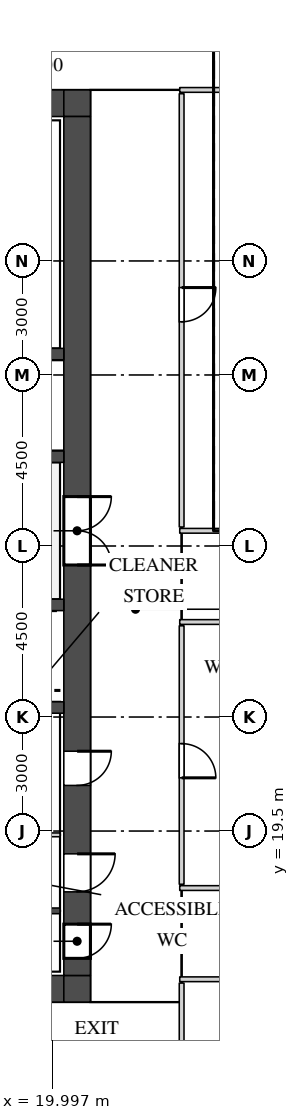
"""IFC4 building model, lengths in metres.
Left out: names, types, materials, properties, quantities, classifications, styles, units other than length and angle.
Written with IfcOpenShell. Run it as: python <this file> out.ifc"""

import sys

from ifc_helpers import new_model, si_unit, direction, frame, frame_2d, origin, place, context, subcontext, project, spatial, rectangle, extrude, source, transform, mapped, element, fill, save


model = new_model("IFC4")
c1 = context("Model", 3, precision=1e-05, world=origin(), true_north=direction((0.0, 1.0)))
c2 = subcontext(c1, "Body", "Model", "MODEL_VIEW")
j1 = project(units=[si_unit("LENGTHUNIT", "METRE"), si_unit("PLANEANGLEUNIT", "RADIAN")], contexts=[c1])
p1 = place(None, origin())
s1 = spatial("IfcSite", under=j1, at=p1, CompositionType="ELEMENT")
p2 = place(p1, origin())
s2 = spatial("IfcBuilding", under=s1, at=p2, CompositionType="ELEMENT")
p3 = place(p2, frame((0.0, 0.0, 234.2)))
s3 = spatial("IfcBuildingStorey", under=s2, at=p3, CompositionType="ELEMENT", Elevation=234.2)
m1 = source(origin(), c2, "Body", "SweptSolid", [
    extrude(rectangle(XDim=13.6, YDim=0.7, at=frame_2d((6.8, 0.0))), origin(), (0.0, 0.0, 1.0), 3.75),
])
p4 = place(p3, frame((6.7, 38.65, 0.0), z_axis=(0.0, 0.0, 1.0), x_axis=(1.0, 0.0, 0.0)))
e1 = element("IfcWall", 1, at=p4, inside=s3, PredefinedType="SHEAR", context=c2, shape_type="MappedRepresentation", body=[
    mapped(m1, transform((0.0, 0.0, 0.0))),
])
m2 = source(origin(), c2, "Body", "SweptSolid", [
    extrude(rectangle(XDim=0.9, YDim=2.1, at=frame_2d((0.45, 1.05))), frame((0.0, 0.36, 0.0), z_axis=(0.0, -1.0, 0.0), x_axis=(1.0, 0.0, 0.0)), (0.0, 0.0, 1.0), 0.72),
])
p5 = place(p4, frame((1.85, 0.0, 0.0)))
e2 = element("IfcOpeningElement", 2, at=p5, cuts=e1, PredefinedType="OPENING", context=c2, shape_type="MappedRepresentation", body=[
    mapped(m2, transform((0.0, 0.0, 0.0))),
])
p6 = place(p4, frame((6.3, 0.0, 0.0)))
e3 = element("IfcOpeningElement", 3, at=p6, cuts=e1, PredefinedType="OPENING", context=c2, shape_type="MappedRepresentation", body=[
    mapped(m2, transform((0.0, 0.0, 0.0))),
])
p7 = place(p4, frame((10.8, 0.0, 0.0)))
e4 = element("IfcOpeningElement", 4, at=p7, cuts=e1, PredefinedType="OPENING", context=c2, shape_type="MappedRepresentation", body=[
    mapped(m2, transform((0.0, 0.0, 0.0))),
])
m3 = source(origin(), c2, "Body", "SweptSolid", [
    extrude(rectangle(XDim=0.7, YDim=0.7, at=frame_2d((0.35, 0.0))), origin(), (0.0, 0.0, 1.0), 3.75),
])
p8 = place(p3, frame((20.3, 38.65, 0.0), z_axis=(0.0, 0.0, 1.0), x_axis=(1.0, 0.0, 0.0)))
e5 = element("IfcWall", 5, at=p8, inside=s3, PredefinedType="SHEAR", context=c2, shape_type="MappedRepresentation", body=[
    mapped(m3, transform((0.0, 0.0, 0.0))),
])
p9 = place(p3, frame((6.7, 15.35, 0.0), z_axis=(0.0, 0.0, 1.0), x_axis=(1.0, 0.0, 0.0)))
e6 = element("IfcWall", 6, at=p9, inside=s3, PredefinedType="SHEAR", context=c2, shape_type="MappedRepresentation", body=[
    mapped(m1, transform((0.0, 0.0, 0.0))),
])
m4 = source(origin(), c2, "Body", "SweptSolid", [
    extrude(rectangle(XDim=1.2, YDim=2.1, at=frame_2d((0.6, 1.05))), frame((0.0, 0.36, 0.0), z_axis=(0.0, -1.0, 0.0), x_axis=(1.0, 0.0, 0.0)), (0.0, 0.0, 1.0), 0.72),
])
p10 = place(p9, frame((5.5, 0.0, 0.0)))
e7 = element("IfcOpeningElement", 7, at=p10, cuts=e6, PredefinedType="OPENING", context=c2, shape_type="MappedRepresentation", body=[
    mapped(m4, transform((0.0, 0.0, 0.0))),
])
p11 = place(p9, frame((2.15, 0.0, 0.0)))
e8 = element("IfcOpeningElement", 8, at=p11, cuts=e6, PredefinedType="OPENING", context=c2, shape_type="MappedRepresentation", body=[
    mapped(m4, transform((0.0, 0.0, 0.0))),
])
m5 = source(origin(), c2, "Body", "SweptSolid", [
    extrude(rectangle(XDim=1.0, YDim=2.1, at=frame_2d((0.5, 1.05))), frame((0.0, 0.36, 0.0), z_axis=(0.0, -1.0, 0.0), x_axis=(1.0, 0.0, 0.0)), (0.0, 0.0, 1.0), 0.72),
])
p12 = place(p9, frame((8.0, 0.0, 0.0)))
e9 = element("IfcOpeningElement", 9, at=p12, cuts=e6, PredefinedType="OPENING", context=c2, shape_type="MappedRepresentation", body=[
    mapped(m5, transform((0.0, 0.0, 0.0))),
])
p13 = place(p3, frame((20.3, 15.35, 0.0), z_axis=(0.0, 0.0, 1.0), x_axis=(1.0, 0.0, 0.0)))
e10 = element("IfcWall", 10, at=p13, inside=s3, PredefinedType="SHEAR", context=c2, shape_type="MappedRepresentation", body=[
    mapped(m3, transform((0.0, 0.0, 0.0))),
])
m6 = source(origin(), c2, "Body", "SweptSolid", [
    extrude(rectangle(XDim=22.6, YDim=0.7, at=frame_2d((11.3, 0.0))), origin(), (0.0, 0.0, 1.0), 3.75),
])
p14 = place(p3, frame((20.65, 15.7, 0.0), z_axis=(0.0, 0.0, 1.0), x_axis=(0.0, 1.0, 0.0)))
e11 = element("IfcWall", 11, at=p14, inside=s3, PredefinedType="SHEAR", context=c2, shape_type="MappedRepresentation", body=[
    mapped(m6, transform((0.0, 0.0, 0.0))),
])
m7 = source(origin(), c2, "Body", "SweptSolid", [
    extrude(rectangle(XDim=1.8, YDim=2.1, at=frame_2d((0.9, 1.05))), frame((0.0, 0.36, 0.0), z_axis=(0.0, -1.0, 0.0), x_axis=(1.0, 0.0, 0.0)), (0.0, 0.0, 1.0), 0.72),
])
p15 = place(p14, frame((10.8, 0.0, 0.0)))
e12 = element("IfcOpeningElement", 12, at=p15, cuts=e11, PredefinedType="OPENING", context=c2, shape_type="MappedRepresentation", body=[
    mapped(m7, transform((0.0, 0.0, 0.0))),
])
p16 = place(p14, frame((0.45, 0.0, 0.0)))
e13 = element("IfcOpeningElement", 13, at=p16, cuts=e11, PredefinedType="OPENING", context=c2, shape_type="MappedRepresentation", body=[
    mapped(m2, transform((0.0, 0.0, 0.0))),
])
p17 = place(p14, frame((2.2, 0.0, 0.0)))
e14 = element("IfcOpeningElement", 14, at=p17, cuts=e11, PredefinedType="OPENING", context=c2, shape_type="MappedRepresentation", body=[
    mapped(m5, transform((0.0, 0.0, 0.0))),
])
p18 = place(p14, frame((5.0, 0.0, 0.0)))
e15 = element("IfcOpeningElement", 15, at=p18, cuts=e11, PredefinedType="OPENING", context=c2, shape_type="MappedRepresentation", body=[
    mapped(m2, transform((0.0, 0.0, 0.0))),
])
m8 = source(origin(), c2, "Body", "SweptSolid", [
    extrude(rectangle(XDim=13.6, YDim=0.3, at=frame_2d((6.8, 0.0))), origin(), (0.0, 0.0, 1.0), 3.75),
])
for number, where, z_axis, x_axis in (
    (16, (6.7, 22.75, 0.0), (0.0, 0.0, 1.0), (1.0, 0.0, 0.0)),
    (17, (6.7, 32.05, 0.0), (0.0, 0.0, 1.0), (1.0, 0.0, 0.0)),
):
    element("IfcWall", number, at=place(p3, frame(where, z_axis=z_axis, x_axis=x_axis)), inside=s3, PredefinedType="STANDARD", context=c2, shape_type="MappedRepresentation", body=[
        mapped(m8, transform((0.0, 0.0, 0.0))),
    ])
p19 = place(p3, frame((6.7, 29.35, 0.0), z_axis=(0.0, 0.0, 1.0), x_axis=(1.0, 0.0, 0.0)))
e18 = element("IfcWall", 18, at=p19, inside=s3, PredefinedType="STANDARD", context=c2, shape_type="MappedRepresentation", body=[
    mapped(m8, transform((0.0, 0.0, 0.0))),
])
m9 = source(origin(), c2, "Body", "SweptSolid", [
    extrude(rectangle(XDim=1.2, YDim=2.1, at=frame_2d((0.6, 1.05))), frame((0.0, 0.16, 0.0), z_axis=(0.0, -1.0, 0.0), x_axis=(1.0, 0.0, 0.0)), (0.0, 0.0, 1.0), 0.32),
])
p20 = place(p19, frame((1.05, 0.0, 0.0)))
e19 = element("IfcOpeningElement", 19, at=p20, cuts=e18, PredefinedType="OPENING", context=c2, shape_type="MappedRepresentation", body=[
    mapped(m9, transform((0.0, 0.0, 0.0))),
])
p21 = place(p19, frame((3.6, 0.0, 0.0)))
e20 = element("IfcOpeningElement", 20, at=p21, cuts=e18, PredefinedType="OPENING", context=c2, shape_type="MappedRepresentation", body=[
    mapped(m9, transform((0.0, 0.0, 0.0))),
])
p22 = place(p19, frame((6.15, 0.0, 0.0)))
e21 = element("IfcOpeningElement", 21, at=p22, cuts=e18, PredefinedType="OPENING", context=c2, shape_type="MappedRepresentation", body=[
    mapped(m9, transform((0.0, 0.0, 0.0))),
])
p23 = place(p19, frame((8.7, 0.0, 0.0)))
e22 = element("IfcOpeningElement", 22, at=p23, cuts=e18, PredefinedType="OPENING", context=c2, shape_type="MappedRepresentation", body=[
    mapped(m9, transform((0.0, 0.0, 0.0))),
])
p24 = place(p19, frame((11.25, 0.0, 0.0)))
e23 = element("IfcOpeningElement", 23, at=p24, cuts=e18, PredefinedType="OPENING", context=c2, shape_type="MappedRepresentation", body=[
    mapped(m9, transform((0.0, 0.0, 0.0))),
])
p25 = place(p3, frame((6.7, 25.45, 0.0), z_axis=(0.0, 0.0, 1.0), x_axis=(1.0, 0.0, 0.0)))
e24 = element("IfcWall", 24, at=p25, inside=s3, PredefinedType="STANDARD", context=c2, shape_type="MappedRepresentation", body=[
    mapped(m8, transform((0.0, 0.0, 0.0))),
])
p26 = place(p25, frame((1.05, 0.0, 0.0)))
e25 = element("IfcOpeningElement", 25, at=p26, cuts=e24, PredefinedType="OPENING", context=c2, shape_type="MappedRepresentation", body=[
    mapped(m9, transform((0.0, 0.0, 0.0))),
])
p27 = place(p25, frame((3.6, 0.0, 0.0)))
e26 = element("IfcOpeningElement", 26, at=p27, cuts=e24, PredefinedType="OPENING", context=c2, shape_type="MappedRepresentation", body=[
    mapped(m9, transform((0.0, 0.0, 0.0))),
])
p28 = place(p25, frame((6.15, 0.0, 0.0)))
e27 = element("IfcOpeningElement", 27, at=p28, cuts=e24, PredefinedType="OPENING", context=c2, shape_type="MappedRepresentation", body=[
    mapped(m9, transform((0.0, 0.0, 0.0))),
])
p29 = place(p25, frame((8.7, 0.0, 0.0)))
e28 = element("IfcOpeningElement", 28, at=p29, cuts=e24, PredefinedType="OPENING", context=c2, shape_type="MappedRepresentation", body=[
    mapped(m9, transform((0.0, 0.0, 0.0))),
])
p30 = place(p25, frame((11.25, 0.0, 0.0)))
e29 = element("IfcOpeningElement", 29, at=p30, cuts=e24, PredefinedType="OPENING", context=c2, shape_type="MappedRepresentation", body=[
    mapped(m9, transform((0.0, 0.0, 0.0))),
])
m10 = source(origin(), c2, "Body", "SweptSolid", [
    extrude(rectangle(XDim=10.85, YDim=0.125, at=frame_2d((5.425, 0.0))), origin(), (0.0, 0.0, 1.0), 3.8),
])
p31 = place(p3, frame((23.4, 4.65, 0.0), z_axis=(0.0, 0.0, 1.0), x_axis=(0.0, 1.0, 0.0)))
e30 = element("IfcWall", 30, at=p31, inside=s3, PredefinedType="PARTITIONING", context=c2, shape_type="MappedRepresentation", body=[
    mapped(m10, transform((0.0, 0.0, 0.0))),
])
m11 = source(origin(), c2, "Body", "SweptSolid", [
    extrude(rectangle(XDim=26.0, YDim=0.125, at=frame_2d((13.0, 0.0))), origin(), (0.0, 0.0, 1.0), 3.8),
])
p32 = place(p3, frame((23.35, 15.6, 0.0), z_axis=(0.0, 0.0, 1.0), x_axis=(1.0, 0.0, 0.0)))
e31 = element("IfcWall", 31, at=p32, inside=s3, PredefinedType="PARTITIONING", context=c2, shape_type="MappedRepresentation", body=[
    mapped(m11, transform((0.0, 0.0, 0.0))),
])
m12 = source(origin(), c2, "Body", "SweptSolid", [
    extrude(rectangle(XDim=1.2, YDim=2.1, at=frame_2d((0.6, 1.05))), frame((0.0, 0.073, 0.0), z_axis=(0.0, -1.0, 0.0), x_axis=(1.0, 0.0, 0.0)), (0.0, 0.0, 1.0), 0.145),
])
p33 = place(p32, frame((5.0, 0.0, 0.0)))
e32 = element("IfcOpeningElement", 32, at=p33, cuts=e31, PredefinedType="OPENING", context=c2, shape_type="MappedRepresentation", body=[
    mapped(m12, transform((0.0, 0.0, 0.0))),
])
m13 = source(origin(), c2, "Body", "SweptSolid", [
    extrude(rectangle(XDim=0.9, YDim=2.1, at=frame_2d((0.45, 1.05))), frame((0.0, 0.073, 0.0), z_axis=(0.0, -1.0, 0.0), x_axis=(1.0, 0.0, 0.0)), (0.0, 0.0, 1.0), 0.145),
])
p34 = place(p32, frame((15.1, 0.0, 0.0)))
e33 = element("IfcOpeningElement", 33, at=p34, cuts=e31, PredefinedType="OPENING", context=c2, shape_type="MappedRepresentation", body=[
    mapped(m13, transform((0.0, 0.0, 0.0))),
])
p35 = place(p32, frame((22.6, 0.0, 0.0)))
e34 = element("IfcOpeningElement", 34, at=p35, cuts=e31, PredefinedType="OPENING", context=c2, shape_type="MappedRepresentation", body=[
    mapped(m13, transform((0.0, 0.0, 0.0))),
])
m14 = source(origin(), c2, "Body", "SweptSolid", [
    extrude(rectangle(XDim=4.0, YDim=0.15, at=frame_2d((2.0, 0.0))), origin(), (0.0, 0.0, 1.0), 3.8),
])
p36 = place(p3, frame((16.2, 17.4, 0.0), z_axis=(0.0, 0.0, 1.0), x_axis=(1.0, 0.0, 0.0)))
e35 = element("IfcWall", 35, at=p36, inside=s3, PredefinedType="PARTITIONING", context=c2, shape_type="MappedRepresentation", body=[
    mapped(m14, transform((0.0, 0.0, 0.0))),
])
p37 = place(p3, frame((23.35, 18.0, 0.0), z_axis=(0.0, 0.0, 1.0), x_axis=(1.0, 0.0, 0.0)))
e36 = element("IfcWall", 36, at=p37, inside=s3, PredefinedType="PARTITIONING", context=c2, shape_type="MappedRepresentation", body=[
    mapped(m11, transform((0.0, 0.0, 0.0))),
])
p38 = place(p37, frame((4.05, 0.0, 0.0)))
e37 = element("IfcOpeningElement", 37, at=p38, cuts=e36, PredefinedType="OPENING", context=c2, shape_type="MappedRepresentation", body=[
    mapped(m13, transform((0.0, 0.0, 0.0))),
])
m15 = source(origin(), c2, "Body", "SweptSolid", [
    extrude(rectangle(XDim=1.0, YDim=2.1, at=frame_2d((0.5, 1.05))), frame((0.0, 0.073, 0.0), z_axis=(0.0, -1.0, 0.0), x_axis=(1.0, 0.0, 0.0)), (0.0, 0.0, 1.0), 0.145),
])
p39 = place(p37, frame((7.4, 0.0, 0.0)))
e38 = element("IfcOpeningElement", 38, at=p39, cuts=e36, PredefinedType="OPENING", context=c2, shape_type="MappedRepresentation", body=[
    mapped(m15, transform((0.0, 0.0, 0.0))),
])
p40 = place(p37, frame((12.55, 0.0, 0.0)))
e39 = element("IfcOpeningElement", 39, at=p40, cuts=e36, PredefinedType="OPENING", context=c2, shape_type="MappedRepresentation", body=[
    mapped(m13, transform((0.0, 0.0, 0.0))),
])
p41 = place(p37, frame((20.8, 0.0, 0.0)))
e40 = element("IfcOpeningElement", 40, at=p41, cuts=e36, PredefinedType="OPENING", context=c2, shape_type="MappedRepresentation", body=[
    mapped(m13, transform((0.0, 0.0, 0.0))),
])
m16 = source(origin(), c2, "Body", "SweptSolid", [
    extrude(rectangle(XDim=6.8, YDim=0.125, at=frame_2d((3.4, 0.0))), origin(), (0.0, 0.0, 1.0), 3.8),
])
p42 = place(p3, frame((23.4, 18.1, 0.0), z_axis=(0.0, 0.0, 1.0), x_axis=(0.0, 1.0, 0.0)))
e41 = element("IfcWall", 41, at=p42, inside=s3, PredefinedType="PARTITIONING", context=c2, shape_type="MappedRepresentation", body=[
    mapped(m16, transform((0.0, 0.0, 0.0))),
])
p43 = place(p42, frame((2.8, 0.0, 0.0)))
e42 = element("IfcOpeningElement", 42, at=p43, cuts=e41, PredefinedType="OPENING", context=c2, shape_type="MappedRepresentation", body=[
    mapped(m13, transform((0.0, 0.0, 0.0))),
])
m17 = source(origin(), c2, "Body", "SweptSolid", [
    extrude(rectangle(XDim=4.1, YDim=0.1, at=frame_2d((2.05, 0.0))), origin(), (0.0, 0.0, 1.0), 3.8),
])
p44 = place(p3, frame((16.1, 19.4, 0.0), z_axis=(0.0, 0.0, 1.0), x_axis=(1.0, 0.0, 0.0)))
e43 = element("IfcWall", 43, at=p44, inside=s3, PredefinedType="PARTITIONING", context=c2, shape_type="MappedRepresentation", body=[
    mapped(m17, transform((0.0, 0.0, 0.0))),
])
p45 = place(p3, frame((23.35, 25.0, 0.0), z_axis=(0.0, 0.0, 1.0), x_axis=(1.0, 0.0, 0.0)))
e44 = element("IfcWall", 44, at=p45, inside=s3, PredefinedType="PARTITIONING", context=c2, shape_type="MappedRepresentation", body=[
    mapped(m11, transform((0.0, 0.0, 0.0))),
])
p46 = place(p3, frame((23.35, 27.4, 0.0), z_axis=(0.0, 0.0, 1.0), x_axis=(1.0, 0.0, 0.0)))
e45 = element("IfcWall", 45, at=p46, inside=s3, PredefinedType="PARTITIONING", context=c2, shape_type="MappedRepresentation", body=[
    mapped(m11, transform((0.0, 0.0, 0.0))),
])
p47 = place(p46, frame((13.0, 0.0, 0.0)))
e46 = element("IfcOpeningElement", 46, at=p47, cuts=e45, PredefinedType="OPENING", context=c2, shape_type="MappedRepresentation", body=[
    mapped(m12, transform((0.0, 0.0, 0.0))),
])
p48 = place(p46, frame((22.6, 0.0, 0.0)))
e47 = element("IfcOpeningElement", 47, at=p48, cuts=e45, PredefinedType="OPENING", context=c2, shape_type="MappedRepresentation", body=[
    mapped(m13, transform((0.0, 0.0, 0.0))),
])
m18 = source(origin(), c2, "Body", "SweptSolid", [
    extrude(rectangle(XDim=11.4, YDim=0.125, at=frame_2d((5.7, 0.0))), origin(), (0.0, 0.0, 1.0), 3.8),
])
p49 = place(p3, frame((23.4, 27.5, 0.0), z_axis=(0.0, 0.0, 1.0), x_axis=(0.0, 1.0, 0.0)))
e48 = element("IfcWall", 48, at=p49, inside=s3, PredefinedType="PARTITIONING", context=c2, shape_type="MappedRepresentation", body=[
    mapped(m18, transform((0.0, 0.0, 0.0))),
])
p50 = place(p49, frame((5.4, 0.0, 0.0)))
e49 = element("IfcOpeningElement", 49, at=p50, cuts=e48, PredefinedType="OPENING", context=c2, shape_type="MappedRepresentation", body=[
    mapped(m13, transform((0.0, 0.0, 0.0))),
])
m19 = source(origin(), c2, "Body", "SweptSolid", [
    extrude(rectangle(XDim=7.1, YDim=0.125, at=frame_2d((3.55, 0.0))), origin(), (0.0, 0.0, 1.0), 3.8),
])
p51 = place(p3, frame((23.35, 39.0, 0.0), z_axis=(0.0, 0.0, 1.0), x_axis=(1.0, 0.0, 0.0)))
e50 = element("IfcWall", 50, at=p51, inside=s3, PredefinedType="PARTITIONING", context=c2, shape_type="MappedRepresentation", body=[
    mapped(m19, transform((0.0, 0.0, 0.0))),
])
m20 = source(origin(), c2, "Body", "SweptSolid", [
    extrude(rectangle(XDim=1.8, YDim=2.1, at=frame_2d((0.9, 1.05))), frame((0.0, 0.3, 0.0), z_axis=(0.0, -1.0, 0.0), x_axis=(1.0, 0.0, 0.0)), (0.0, 0.0, 1.0), 0.6),
])
p52 = place(p15, origin())
e51 = element("IfcDoor", 51, at=p52, inside=s3, OperationType="DOUBLE_DOOR_SINGLE_SWING", PredefinedType="DOOR", context=c2, shape_type="MappedRepresentation", body=[
    mapped(m20, transform((0.0, 0.0, 0.0))),
])
fill(e12, e51)
m21 = source(origin(), c2, "Body", "SweptSolid", [
    extrude(rectangle(XDim=0.9, YDim=2.1, at=frame_2d((0.45, 1.05))), frame((0.0, 0.3, 0.0), z_axis=(0.0, -1.0, 0.0), x_axis=(1.0, 0.0, 0.0)), (0.0, 0.0, 1.0), 0.6),
])
p53 = place(p16, origin())
e52 = element("IfcDoor", 52, at=p53, inside=s3, OperationType="SINGLE_SWING_RIGHT", PredefinedType="DOOR", context=c2, shape_type="MappedRepresentation", body=[
    mapped(m21, transform((0.0, 0.0, 0.0))),
])
fill(e13, e52)
m22 = source(origin(), c2, "Body", "SweptSolid", [
    extrude(rectangle(XDim=1.0, YDim=2.1, at=frame_2d((0.5, 1.05))), frame((0.0, 0.3, 0.0), z_axis=(0.0, -1.0, 0.0), x_axis=(1.0, 0.0, 0.0)), (0.0, 0.0, 1.0), 0.6),
])
p54 = place(p17, origin())
e53 = element("IfcDoor", 53, at=p54, inside=s3, OperationType="SINGLE_SWING_RIGHT", PredefinedType="DOOR", context=c2, shape_type="MappedRepresentation", body=[
    mapped(m22, transform((0.0, 0.0, 0.0))),
])
fill(e14, e53)
p55 = place(p18, origin())
e54 = element("IfcDoor", 54, at=p55, inside=s3, OperationType="SINGLE_SWING_RIGHT", PredefinedType="DOOR", context=c2, shape_type="MappedRepresentation", body=[
    mapped(m21, transform((0.0, 0.0, 0.0))),
])
fill(e15, e54)
m23 = source(origin(), c2, "Body", "SweptSolid", [
    extrude(rectangle(XDim=0.9, YDim=2.1, at=frame_2d((0.45, 1.05))), frame((0.0, 0.025, 0.0), z_axis=(0.0, -1.0, 0.0), x_axis=(1.0, 0.0, 0.0)), (0.0, 0.0, 1.0), 0.05),
])
p56 = place(p43, origin())
e55 = element("IfcDoor", 55, at=p56, inside=s3, OperationType="SINGLE_SWING_LEFT", PredefinedType="DOOR", context=c2, shape_type="MappedRepresentation", body=[
    mapped(m23, transform((0.0, 0.0, 0.0))),
])
fill(e42, e55)
p57 = place(p50, origin())
e56 = element("IfcDoor", 56, at=p57, inside=s3, OperationType="SINGLE_SWING_RIGHT", PredefinedType="DOOR", context=c2, shape_type="MappedRepresentation", body=[
    mapped(m23, transform((0.0, 0.0, 0.0))),
])
fill(e49, e56)
save(model, sys.argv[1])
